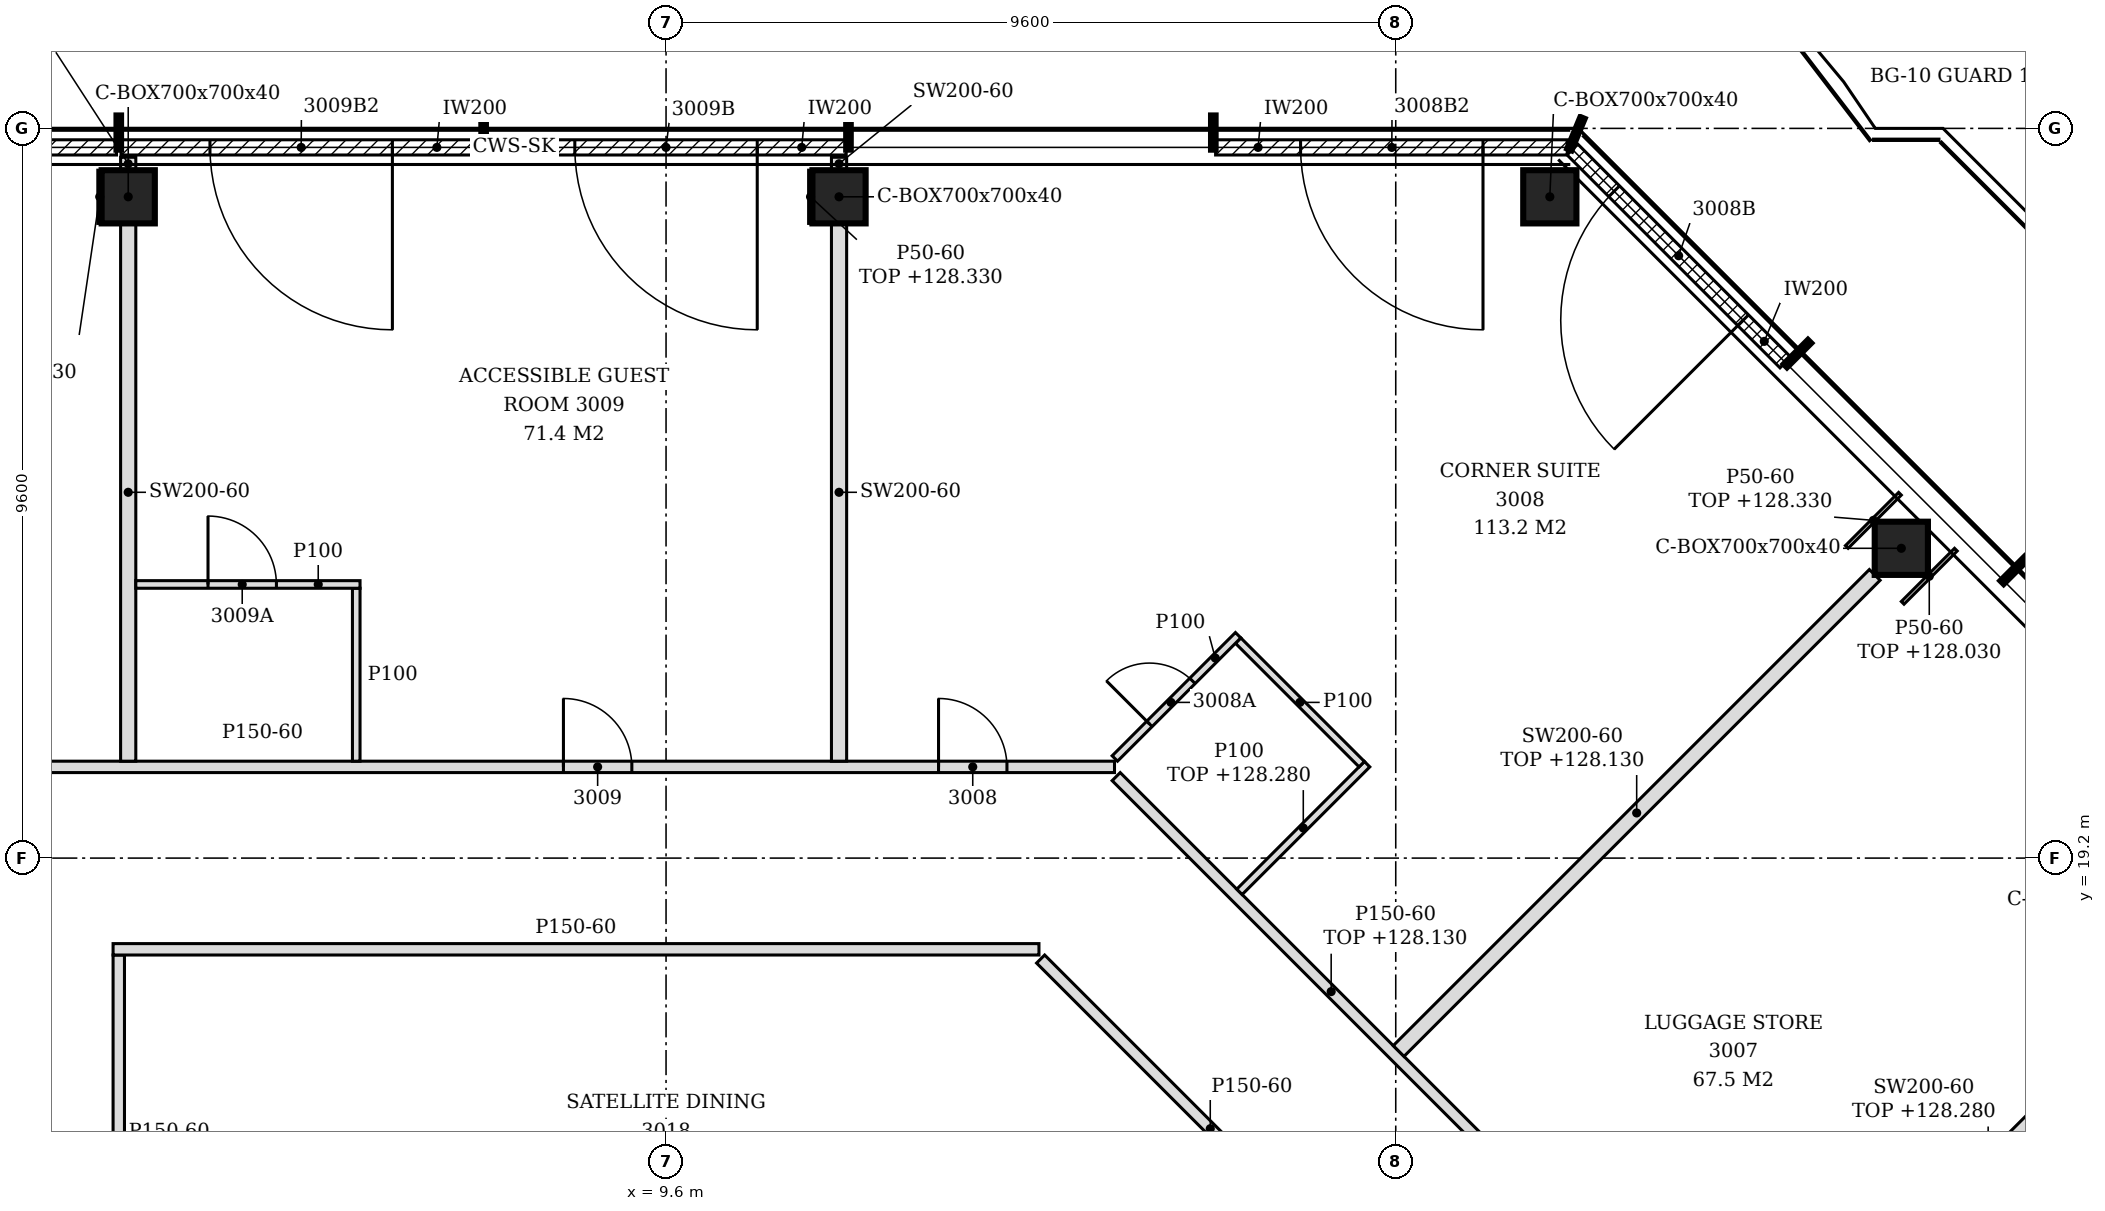
"""IFC4 building model, lengths in metres.
Left out: names, types, materials, properties, quantities, classifications, styles, units other than length and angle.
Written with IfcOpenShell. Run it as: python <this file> out.ifc"""

import sys

from ifc_helpers import new_model, si_unit, direction, frame, frame_2d, origin, origin_2d, place, context, subcontext, project, spatial, polyline, rectangle, hollow_rectangle, outline, extrude, element, fill, save


model = new_model("IFC4")
c1 = context("Model", 3, precision=1e-05, world=origin(), true_north=direction((0.0, 1.0)))
c2 = subcontext(c1, "Body", "Model", "MODEL_VIEW")
j1 = project(units=[si_unit("LENGTHUNIT", "METRE"), si_unit("PLANEANGLEUNIT", "RADIAN")], contexts=[c1])
p1 = place(None, origin())
s1 = spatial("IfcSite", under=j1, at=p1, CompositionType="ELEMENT")
p2 = place(p1, origin())
s2 = spatial("IfcBuilding", under=s1, at=p2, CompositionType="ELEMENT")
p3 = place(p2, frame((0.0, 0.0, 125.4)))
s3 = spatial("IfcBuildingStorey", under=s2, at=p3, CompositionType="ELEMENT", Elevation=125.4)
for number, where, z_axis, x_axis in (
    (1, (25.852, 23.276, -0.15), (0.0, 0.0, 1.0), (1.0, 0.0, 0.0)),
    (2, (21.227, 27.9, -0.15), (0.0, 0.0, 1.0), (1.0, 0.0, 0.0)),
    (3, (11.876, 27.9, -0.15), (0.0, 0.0, 1.0), (1.0, 0.0, 0.0)),
    (4, (2.524, 27.9, -0.15), (0.0, 0.0, 1.0), (1.0, 0.0, 0.0)),
):
    element("IfcColumn", number, at=place(p3, frame(where, z_axis=z_axis, x_axis=x_axis)), inside=s3, PredefinedType="COLUMN", context=c2, shape_type="SweptSolid", body=[
        extrude(hollow_rectangle(XDim=0.7, YDim=0.7, WallThickness=0.04, at=origin_2d()), origin(), (0.0, 0.0, 1.0), 3.6),
    ])
p4 = place(p3, frame((24.326, 25.72, 0.0), z_axis=(0.0, 0.0, 1.0), x_axis=(-0.707106781187, 0.707106781187, 0.0)))
e5 = element("IfcWall", 5, at=p4, inside=s3, PredefinedType="NOTDEFINED", context=c2, shape_type="SweptSolid", body=[
    extrude(rectangle(XDim=3.962, YDim=0.2, at=frame_2d((1.981, 0.0))), origin(), (0.0, 0.0, 1.0), 3.45),
])
p5 = place(p4, frame((0.786, 0.0, 0.0)))
e6 = element("IfcOpeningElement", 6, at=p5, cuts=e5, PredefinedType="OPENING", context=c2, shape_type="SweptSolid", body=[
    extrude(rectangle(XDim=2.4, YDim=2.4, at=frame_2d((1.2, 1.2))), frame((0.0, 0.11, 0.0), z_axis=(0.0, -1.0, 0.0), x_axis=(1.0, 0.0, 0.0)), (0.0, 0.0, 1.0), 0.22),
])
p6 = place(p3, frame((21.457, 28.55, 0.0), z_axis=(0.0, 0.0, 1.0), x_axis=(-1.0, 0.0, 0.0)))
e7 = element("IfcWall", 7, at=p6, inside=s3, PredefinedType="NOTDEFINED", context=c2, shape_type="SweptSolid", body=[
    extrude(rectangle(XDim=4.626, YDim=0.2, at=frame_2d((2.313, 0.0))), origin(), (0.0, 0.0, 1.0), 3.45),
])
p7 = place(p6, frame((1.108, 0.0, 0.0)))
e8 = element("IfcOpeningElement", 8, at=p7, cuts=e7, PredefinedType="OPENING", context=c2, shape_type="SweptSolid", body=[
    extrude(rectangle(XDim=2.4, YDim=2.4, at=frame_2d((1.2, 1.2))), frame((0.0, 0.11, 0.0), z_axis=(0.0, -1.0, 0.0), x_axis=(1.0, 0.0, 0.0)), (0.0, 0.0, 1.0), 0.22),
])
p8 = place(p3, frame((11.97, 28.55, 0.0), z_axis=(0.0, 0.0, 1.0), x_axis=(-1.0, 0.0, 0.0)))
e9 = element("IfcWall", 9, at=p8, inside=s3, PredefinedType="NOTDEFINED", context=c2, shape_type="SweptSolid", body=[
    extrude(rectangle(XDim=4.74, YDim=0.2, at=frame_2d((2.37, 0.0))), origin(), (0.0, 0.0, 1.0), 3.45),
])
p9 = place(p8, frame((1.17, 0.0, 0.0)))
e10 = element("IfcOpeningElement", 10, at=p9, cuts=e9, PredefinedType="OPENING", context=c2, shape_type="SweptSolid", body=[
    extrude(rectangle(XDim=2.4, YDim=2.4, at=frame_2d((1.2, 1.2))), frame((0.0, 0.11, 0.0), z_axis=(0.0, -1.0, 0.0), x_axis=(1.0, 0.0, 0.0)), (0.0, 0.0, 1.0), 0.22),
])
p10 = place(p3, frame((7.17, 28.55, 0.0), z_axis=(0.0, 0.0, 1.0), x_axis=(-1.0, 0.0, 0.0)))
e11 = element("IfcWall", 11, at=p10, inside=s3, PredefinedType="NOTDEFINED", context=c2, shape_type="SweptSolid", body=[
    extrude(rectangle(XDim=4.74, YDim=0.2, at=frame_2d((2.37, 0.0))), origin(), (0.0, 0.0, 1.0), 3.45),
])
p11 = place(p10, frame((1.17, 0.0, 0.0)))
e12 = element("IfcOpeningElement", 12, at=p11, cuts=e11, PredefinedType="OPENING", context=c2, shape_type="SweptSolid", body=[
    extrude(rectangle(XDim=2.4, YDim=2.4, at=frame_2d((1.2, 1.2))), frame((0.0, 0.11, 0.0), z_axis=(0.0, -1.0, 0.0), x_axis=(1.0, 0.0, 0.0)), (0.0, 0.0, 1.0), 0.22),
])
p12 = place(p3, frame((2.37, 28.55, 0.0), z_axis=(0.0, 0.0, 1.0), x_axis=(-1.0, 0.0, 0.0)))
e13 = element("IfcWall", 13, at=p12, inside=s3, PredefinedType="NOTDEFINED", context=c2, shape_type="SweptSolid", body=[
    extrude(rectangle(XDim=4.74, YDim=0.2, at=frame_2d((2.37, 0.0))), origin(), (0.0, 0.0, 1.0), 3.45),
])
p13 = place(p12, frame((1.17, 0.0, 0.0)))
e14 = element("IfcOpeningElement", 14, at=p13, cuts=e13, PredefinedType="OPENING", context=c2, shape_type="SweptSolid", body=[
    extrude(rectangle(XDim=2.4, YDim=2.4, at=frame_2d((1.2, 1.2))), frame((0.0, 0.11, 0.0), z_axis=(0.0, -1.0, 0.0), x_axis=(1.0, 0.0, 0.0)), (0.0, 0.0, 1.0), 0.22),
])
p14 = place(p3, frame((27.472, 8.322, 0.0), z_axis=(0.0, 0.0, 1.0), x_axis=(-0.707106781187, 0.707106781187, 0.0)))
e15 = element("IfcWall", 15, at=p14, inside=s3, PredefinedType="PARTITIONING", context=c2, shape_type="SweptSolid", body=[
    extrude(rectangle(XDim=16.9, YDim=0.15, at=frame_2d((8.45, 0.0))), origin(), (0.0, 0.0, 1.0), 2.73),
])
p15 = place(p14, frame((3.044, 0.0, 0.0)))
e16 = element("IfcOpeningElement", 16, at=p15, cuts=e15, PredefinedType="OPENING", context=c2, shape_type="SweptSolid", body=[
    extrude(rectangle(XDim=0.9, YDim=2.1, at=frame_2d((0.45, 1.05))), frame((0.0, 0.085, 0.0), z_axis=(0.0, -1.0, 0.0), x_axis=(1.0, 0.0, 0.0)), (0.0, 0.0, 1.0), 0.17),
])
p16 = place(p14, frame((8.0, 0.0, 0.0)))
e17 = element("IfcOpeningElement", 17, at=p16, cuts=e15, PredefinedType="OPENING", context=c2, shape_type="SweptSolid", body=[
    extrude(rectangle(XDim=0.9, YDim=2.1, at=frame_2d((0.45, 1.05))), frame((0.0, 0.085, 0.0), z_axis=(0.0, -1.0, 0.0), x_axis=(1.0, 0.0, 0.0)), (0.0, 0.0, 1.0), 0.17),
])
p17 = place(p3, frame((23.862, 12.038, 0.0), z_axis=(0.0, 0.0, 1.0), x_axis=(0.707106781187, 0.707106781187, 0.0)))
e18 = element("IfcWall", 18, at=p17, inside=s3, PredefinedType="PARTITIONING", context=c2, shape_type="SweptSolid", body=[
    extrude(rectangle(XDim=8.858, YDim=0.2, at=frame_2d((4.429, 0.0))), origin(), (0.0, 0.0, 1.0), 2.88),
])
p18 = place(p3, frame((2.4, 13.275, 0.0), z_axis=(0.0, 0.0, 1.0), x_axis=(0.0, 1.0, 0.0)))
e19 = element("IfcWall", 19, at=p18, inside=s3, PredefinedType="PARTITIONING", context=c2, shape_type="SweptSolid", body=[
    extrude(outline(polyline([(0.0, 0.0), (4.65, 0.0), (4.65, 3.45), (0.075, 3.45), (0.073, 2.83), (0.0, 2.83), (0.0, 0.0)])), frame((0.0, 0.075, 0.0), z_axis=(0.0, -1.0, 0.0), x_axis=(1.0, 0.0, 0.0)), (0.0, 0.0, 1.0), 0.15),
])
p19 = place(p3, frame((18.991, 13.408, 0.0), z_axis=(0.0, 0.0, 1.0), x_axis=(-0.707087442572, 0.707126119272, 0.0)))
e20 = element("IfcWall", 20, at=p19, inside=s3, PredefinedType="PARTITIONING", context=c2, shape_type="SweptSolid", body=[
    extrude(rectangle(XDim=6.312, YDim=0.15, at=frame_2d((3.156, 0.0))), origin(), (0.0, 0.0, 1.0), 3.45),
])
p20 = place(p3, frame((19.238, 16.662, 0.0), z_axis=(0.0, 0.0, 1.0), x_axis=(0.707120561855, 0.707093000249, 0.0)))
e21 = element("IfcWall", 21, at=p20, inside=s3, PredefinedType="PARTITIONING", context=c2, shape_type="SweptSolid", body=[
    extrude(rectangle(XDim=8.858, YDim=0.2, at=frame_2d((4.429, 0.0))), origin(), (0.0, 0.0, 1.0), 2.73),
])
p21 = place(p3, frame((2.325, 18.0, 0.0), z_axis=(0.0, 0.0, 1.0), x_axis=(1.0, 0.0, 0.0)))
e22 = element("IfcWall", 22, at=p21, inside=s3, PredefinedType="PARTITIONING", context=c2, shape_type="SweptSolid", body=[
    extrude(outline(polyline([(0.0, 0.0), (12.181, 0.0), (12.181, 3.45), (5.025, 3.45), (5.023, 2.73), (4.725, 2.73), (4.723, 3.45), (0.0, 3.45), (0.0, 0.0)])), frame((0.0, 0.075, 0.0), z_axis=(0.0, -1.0, 0.0), x_axis=(1.0, 0.0, 0.0)), (0.0, 0.0, 1.0), 0.15),
])
p22 = place(p3, frame((17.144, 18.756, 0.0), z_axis=(0.0, 0.0, 1.0), x_axis=(0.707106781187, 0.707106781187, 0.0)))
e23 = element("IfcWall", 23, at=p22, inside=s3, PredefinedType="PARTITIONING", context=c2, shape_type="SweptSolid", body=[
    extrude(rectangle(XDim=2.375, YDim=0.1, at=frame_2d((1.188, 0.0))), origin(), (0.0, 0.0, 1.0), 2.88),
])
p23 = place(p3, frame((-1.1, 20.4, 0.0), z_axis=(0.0, 0.0, 1.0), x_axis=(1.0, 0.0, 0.0)))
e24 = element("IfcWall", 24, at=p23, inside=s3, PredefinedType="PARTITIONING", context=c2, shape_type="SweptSolid", body=[
    extrude(outline(polyline([(0.0, 0.0), (16.6, 0.0), (16.6, 3.45), (8.45, 3.45), (8.448, 2.73), (8.15, 2.73), (8.148, 3.45), (0.0, 3.45), (0.0, 0.0)])), frame((0.0, 0.075, 0.0), z_axis=(0.0, -1.0, 0.0), x_axis=(1.0, 0.0, 0.0)), (0.0, 0.0, 1.0), 0.15),
])
p24 = place(p23, frame((14.285, 0.0, 0.0)))
e25 = element("IfcOpeningElement", 25, at=p24, cuts=e24, PredefinedType="OPENING", context=c2, shape_type="SweptSolid", body=[
    extrude(rectangle(XDim=0.9, YDim=2.1, at=frame_2d((0.45, 1.05))), frame((0.0, 0.085, 0.0), z_axis=(0.0, -1.0, 0.0), x_axis=(1.0, 0.0, 0.0)), (0.0, 0.0, 1.0), 0.17),
])
p25 = place(p23, frame((9.35, 0.0, 0.0)))
e26 = element("IfcOpeningElement", 26, at=p25, cuts=e24, PredefinedType="OPENING", context=c2, shape_type="SweptSolid", body=[
    extrude(rectangle(XDim=0.9, YDim=2.1, at=frame_2d((0.45, 1.05))), frame((0.0, 0.085, 0.0), z_axis=(0.0, -1.0, 0.0), x_axis=(1.0, 0.0, 0.0)), (0.0, 0.0, 1.0), 0.17),
])
p26 = place(p23, frame((1.415, 0.0, 0.0)))
e27 = element("IfcOpeningElement", 27, at=p26, cuts=e24, PredefinedType="OPENING", context=c2, shape_type="SweptSolid", body=[
    extrude(rectangle(XDim=0.9, YDim=2.1, at=frame_2d((0.45, 1.05))), frame((0.0, 0.085, 0.0), z_axis=(0.0, -1.0, 0.0), x_axis=(1.0, 0.0, 0.0)), (0.0, 0.0, 1.0), 0.17),
])
p27 = place(p3, frame((18.753, 20.435, 0.0), z_axis=(0.0, 0.0, 1.0), x_axis=(-0.707106781187, 0.707106781187, 0.0)))
e28 = element("IfcWall", 28, at=p27, inside=s3, PredefinedType="PARTITIONING", context=c2, shape_type="SweptSolid", body=[
    extrude(rectangle(XDim=2.3, YDim=0.1, at=frame_2d((1.15, 0.0))), origin(), (0.0, 0.0, 1.0), 3.45),
])
p28 = place(p3, frame((2.524, 20.475, 0.0), z_axis=(0.0, 0.0, 1.0), x_axis=(0.0, 1.0, 0.0)))
e29 = element("IfcWall", 29, at=p28, inside=s3, PredefinedType="PARTITIONING", context=c2, shape_type="SweptSolid", body=[
    extrude(outline(polyline([(0.0, 0.0), (7.075, 0.0), (7.075, 3.45), (3.63, 3.45), (3.628, 2.88), (3.42, 2.88), (3.418, 3.45), (0.0, 3.45), (0.0, 0.0)])), frame((0.0, 0.1, 0.0), z_axis=(0.0, -1.0, 0.0), x_axis=(1.0, 0.0, 0.0)), (0.0, 0.0, 1.0), 0.2),
])
p29 = place(p3, frame((5.524, 20.475, 0.0), z_axis=(0.0, 0.0, 1.0), x_axis=(0.0, 1.0, 0.0)))
e30 = element("IfcWall", 30, at=p29, inside=s3, PredefinedType="PARTITIONING", context=c2, shape_type="SweptSolid", body=[
    extrude(rectangle(XDim=2.275, YDim=0.1, at=frame_2d((1.137, 0.0))), origin(), (0.0, 0.0, 1.0), 3.45),
])
p30 = place(p3, frame((11.876, 20.475, 0.0), z_axis=(0.0, 0.0, 1.0), x_axis=(0.0, 1.0, 0.0)))
e31 = element("IfcWall", 31, at=p30, inside=s3, PredefinedType="PARTITIONING", context=c2, shape_type="SweptSolid", body=[
    extrude(outline(polyline([(0.0, 0.0), (7.075, 0.0), (7.075, 3.45), (3.63, 3.45), (3.628, 2.88), (3.42, 2.88), (3.418, 3.45), (0.0, 3.45), (0.0, 0.0)])), frame((0.0, 0.1, 0.0), z_axis=(0.0, -1.0, 0.0), x_axis=(1.0, 0.0, 0.0)), (0.0, 0.0, 1.0), 0.2),
])
p31 = place(p3, frame((15.504, 20.51, 0.0), z_axis=(0.0, 0.0, 1.0), x_axis=(0.707159997125, 0.707053561243, 0.0)))
e32 = element("IfcWall", 32, at=p31, inside=s3, PredefinedType="PARTITIONING", context=c2, shape_type="SweptSolid", body=[
    extrude(rectangle(XDim=2.294, YDim=0.1, at=frame_2d((1.147, 0.0))), origin(), (0.0, 0.0, 1.0), 3.45),
])
p32 = place(p31, frame((0.644, 0.0, 0.0)))
e33 = element("IfcOpeningElement", 33, at=p32, cuts=e32, PredefinedType="OPENING", context=c2, shape_type="SweptSolid", body=[
    extrude(rectangle(XDim=0.8, YDim=2.1, at=frame_2d((0.4, 1.05))), frame((0.0, 0.06, 0.0), z_axis=(0.0, -1.0, 0.0), x_axis=(1.0, 0.0, 0.0)), (0.0, 0.0, 1.0), 0.12),
])
p33 = place(p3, frame((2.624, 22.8, 0.0), z_axis=(0.0, 0.0, 1.0), x_axis=(1.0, 0.0, 0.0)))
e34 = element("IfcWall", 34, at=p33, inside=s3, PredefinedType="PARTITIONING", context=c2, shape_type="SweptSolid", body=[
    extrude(rectangle(XDim=2.95, YDim=0.1, at=frame_2d((1.475, 0.0))), origin(), (0.0, 0.0, 1.0), 3.45),
])
p34 = place(p33, frame((0.95, 0.0, 0.0)))
e35 = element("IfcOpeningElement", 35, at=p34, cuts=e34, PredefinedType="OPENING", context=c2, shape_type="SweptSolid", body=[
    extrude(rectangle(XDim=0.9, YDim=2.1, at=frame_2d((0.45, 1.05))), frame((0.0, 0.06, 0.0), z_axis=(0.0, -1.0, 0.0), x_axis=(1.0, 0.0, 0.0)), (0.0, 0.0, 1.0), 0.12),
])
for number, where, z_axis, x_axis in (
    (36, (2.524, 28.25, 0.0), (0.0, 0.0, 1.0), (0.0, 1.0, 0.0)),
    (37, (11.876, 28.25, 0.0), (0.0, 0.0, 1.0), (0.0, 1.0, 0.0)),
):
    element("IfcWall", number, at=place(p3, frame(where, z_axis=z_axis, x_axis=x_axis)), inside=s3, PredefinedType="PARTITIONING", context=c2, shape_type="SweptSolid", body=[
        extrude(rectangle(XDim=0.17, YDim=0.2, at=frame_2d((0.085, 0.0))), origin(), (0.0, 0.0, 1.0), 3.45),
    ])
p35 = place(p3, frame((25.134, 23.293, 0.0), z_axis=(0.0, 0.0, 1.0), x_axis=(0.707106781187, 0.707106781187, 0.0)))
e38 = element("IfcWall", 38, at=p35, inside=s3, PredefinedType="PARTITIONING", context=c2, shape_type="SweptSolid", body=[
    extrude(rectangle(XDim=0.99, YDim=0.05, at=frame_2d((0.495, 0.0))), origin(), (0.0, 0.0, 1.0), 2.93),
])
p36 = place(p3, frame((25.869, 22.558, 0.0), z_axis=(0.0, 0.0, 1.0), x_axis=(0.707106781187, 0.707106781187, 0.0)))
e39 = element("IfcWall", 39, at=p36, inside=s3, PredefinedType="PARTITIONING", context=c2, shape_type="SweptSolid", body=[
    extrude(rectangle(XDim=0.99, YDim=0.05, at=frame_2d((0.495, 0.0))), origin(), (0.0, 0.0, 1.0), 2.63),
])
for number, where, z_axis, x_axis in (
    (40, (2.149, 27.55, 0.0), (0.0, 0.0, 1.0), (0.0, 1.0, 0.0)),
    (41, (11.501, 27.55, 0.0), (0.0, 0.0, 1.0), (0.0, 1.0, 0.0)),
):
    element("IfcWall", number, at=place(p3, frame(where, z_axis=z_axis, x_axis=x_axis)), inside=s3, PredefinedType="PARTITIONING", context=c2, shape_type="SweptSolid", body=[
        extrude(rectangle(XDim=0.7, YDim=0.05, at=frame_2d((0.35, 0.0))), origin(), (0.0, 0.0, 1.0), 2.93),
    ])
p37 = place(p5, origin())
e42 = element("IfcDoor", 42, at=p37, inside=s3, OperationType="SINGLE_SWING_LEFT", PredefinedType="DOOR", context=c2, shape_type="SweptSolid", body=[
    extrude(rectangle(XDim=2.4, YDim=2.4, at=frame_2d((1.2, 1.2))), frame((0.0, 0.025, 0.0), z_axis=(0.0, -1.0, 0.0), x_axis=(1.0, 0.0, 0.0)), (0.0, 0.0, 1.0), 0.05),
])
fill(e6, e42)
p38 = place(p7, origin())
e43 = element("IfcDoor", 43, at=p38, inside=s3, OperationType="SINGLE_SWING_LEFT", PredefinedType="DOOR", context=c2, shape_type="SweptSolid", body=[
    extrude(rectangle(XDim=2.4, YDim=2.4, at=frame_2d((1.2, 1.2))), frame((0.0, 0.025, 0.0), z_axis=(0.0, -1.0, 0.0), x_axis=(1.0, 0.0, 0.0)), (0.0, 0.0, 1.0), 0.05),
])
fill(e8, e43)
p39 = place(p9, origin())
e44 = element("IfcDoor", 44, at=p39, inside=s3, OperationType="SINGLE_SWING_LEFT", PredefinedType="DOOR", context=c2, shape_type="SweptSolid", body=[
    extrude(rectangle(XDim=2.4, YDim=2.4, at=frame_2d((1.2, 1.2))), frame((0.0, 0.025, 0.0), z_axis=(0.0, -1.0, 0.0), x_axis=(1.0, 0.0, 0.0)), (0.0, 0.0, 1.0), 0.05),
])
fill(e10, e44)
p40 = place(p11, origin())
e45 = element("IfcDoor", 45, at=p40, inside=s3, OperationType="SINGLE_SWING_LEFT", PredefinedType="DOOR", context=c2, shape_type="SweptSolid", body=[
    extrude(rectangle(XDim=2.4, YDim=2.4, at=frame_2d((1.2, 1.2))), frame((0.0, 0.025, 0.0), z_axis=(0.0, -1.0, 0.0), x_axis=(1.0, 0.0, 0.0)), (0.0, 0.0, 1.0), 0.05),
])
fill(e12, e45)
p41 = place(p24, origin())
e46 = element("IfcDoor", 46, at=p41, inside=s3, OperationType="SINGLE_SWING_LEFT", PredefinedType="DOOR", context=c2, shape_type="SweptSolid", body=[
    extrude(rectangle(XDim=0.9, YDim=2.1, at=frame_2d((0.45, 1.05))), frame((0.0, 0.025, 0.0), z_axis=(0.0, -1.0, 0.0), x_axis=(1.0, 0.0, 0.0)), (0.0, 0.0, 1.0), 0.05),
])
fill(e25, e46)
p42 = place(p32, origin())
e47 = element("IfcDoor", 47, at=p42, inside=s3, OperationType="SINGLE_SWING_LEFT", PredefinedType="DOOR", context=c2, shape_type="SweptSolid", body=[
    extrude(rectangle(XDim=0.8, YDim=2.1, at=frame_2d((0.4, 1.05))), frame((0.0, 0.025, 0.0), z_axis=(0.0, -1.0, 0.0), x_axis=(1.0, 0.0, 0.0)), (0.0, 0.0, 1.0), 0.05),
])
fill(e33, e47)
p43 = place(p25, origin())
e48 = element("IfcDoor", 48, at=p43, inside=s3, OperationType="SINGLE_SWING_LEFT", PredefinedType="DOOR", context=c2, shape_type="SweptSolid", body=[
    extrude(rectangle(XDim=0.9, YDim=2.1, at=frame_2d((0.45, 1.05))), frame((0.0, 0.025, 0.0), z_axis=(0.0, -1.0, 0.0), x_axis=(1.0, 0.0, 0.0)), (0.0, 0.0, 1.0), 0.05),
])
fill(e26, e48)
p44 = place(p34, origin())
e49 = element("IfcDoor", 49, at=p44, inside=s3, OperationType="SINGLE_SWING_LEFT", PredefinedType="DOOR", context=c2, shape_type="SweptSolid", body=[
    extrude(rectangle(XDim=0.9, YDim=2.1, at=frame_2d((0.45, 1.05))), frame((0.0, 0.025, 0.0), z_axis=(0.0, -1.0, 0.0), x_axis=(1.0, 0.0, 0.0)), (0.0, 0.0, 1.0), 0.05),
])
fill(e35, e49)
save(model, sys.argv[1])
